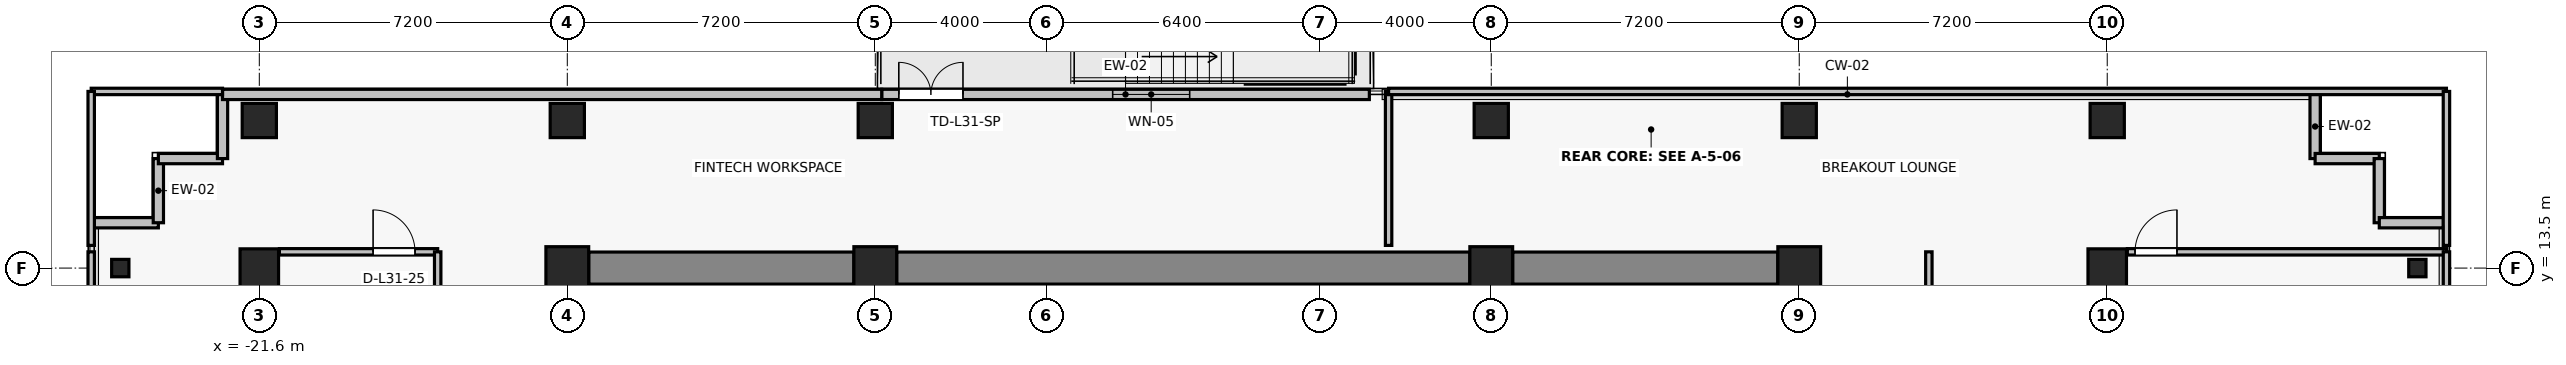
"""IFC4 building model, lengths in metres.
Left out: names, types, materials, properties, quantities, classifications, styles, units other than length and angle.
Written with IfcOpenShell. Run it as: python <this file> out.ifc"""

import sys

from ifc_helpers import new_model, si_unit, direction, frame, frame_2d, origin, origin_2d, place, context, subcontext, project, spatial, rectangle, i_section, extrude, source, transform, mapped, element, fill, save


model = new_model("IFC4")
c1 = context("Model", 3, precision=1e-05, world=origin(), true_north=direction((0.0, 1.0)))
c2 = subcontext(c1, "Body", "Model", "MODEL_VIEW")
j1 = project(units=[si_unit("LENGTHUNIT", "METRE"), si_unit("PLANEANGLEUNIT", "RADIAN")], contexts=[c1])
p1 = place(None, origin())
s1 = spatial("IfcSite", under=j1, at=p1, CompositionType="ELEMENT")
p2 = place(p1, origin())
s2 = spatial("IfcBuilding", under=s1, at=p2, CompositionType="ELEMENT")
p3 = place(p2, frame((0.0, 0.0, 113.2)))
s3 = spatial("IfcBuildingStorey", under=s2, at=p3, CompositionType="ELEMENT", Elevation=113.2)
for number, where, z_axis, x_axis in (
    (1, (-14.4, 13.5, 0.0), (0.0, 0.0, 1.0), (1.0, 0.0, 0.0)),
    (2, (-7.2, 13.5, 0.0), (0.0, 0.0, 1.0), (1.0, 0.0, 0.0)),
    (3, (7.2, 13.5, 0.0), (0.0, 0.0, 1.0), (1.0, 0.0, 0.0)),
    (4, (14.4, 13.5, 0.0), (0.0, 0.0, 1.0), (1.0, 0.0, 0.0)),
):
    element("IfcColumn", number, at=place(p3, frame(where, z_axis=z_axis, x_axis=x_axis)), inside=s3, PredefinedType="COLUMN", context=c2, shape_type="SweptSolid", body=[
        extrude(rectangle(XDim=1.0, YDim=1.0, at=origin_2d()), origin(), (0.0, 0.0, 1.0), 3.3),
    ])
for number, where, z_axis, x_axis in (
    (5, (-21.6, 13.5, 0.0), (0.0, 0.0, 1.0), (1.0, 0.0, 0.0)),
    (6, (21.6, 13.5, 0.0), (0.0, 0.0, 1.0), (1.0, 0.0, 0.0)),
):
    element("IfcColumn", number, at=place(p3, frame(where, z_axis=z_axis, x_axis=x_axis)), inside=s3, PredefinedType="COLUMN", context=c2, shape_type="SweptSolid", body=[
        extrude(rectangle(XDim=0.9, YDim=0.9, at=origin_2d()), origin(), (0.0, 0.0, 1.0), 3.3),
    ])
for number, where, z_axis, x_axis in (
    (7, (-14.4, 16.95, 0.0), (0.0, 0.0, 1.0), (1.0, 0.0, 0.0)),
    (8, (-7.2, 16.95, 0.0), (0.0, 0.0, 1.0), (1.0, 0.0, 0.0)),
    (9, (7.2, 16.95, 0.0), (0.0, 0.0, 1.0), (1.0, 0.0, 0.0)),
    (10, (14.4, 16.95, 0.0), (0.0, 0.0, 1.0), (1.0, 0.0, 0.0)),
    (11, (-21.6, 16.95, 0.0), (0.0, 0.0, 1.0), (1.0, 0.0, 0.0)),
    (12, (21.6, 16.95, 0.0), (0.0, 0.0, 1.0), (1.0, 0.0, 0.0)),
):
    element("IfcColumn", number, at=place(p3, frame(where, z_axis=z_axis, x_axis=x_axis)), inside=s3, PredefinedType="COLUMN", context=c2, shape_type="SweptSolid", body=[
        extrude(rectangle(XDim=0.8, YDim=0.8, at=origin_2d()), origin(), (0.0, 0.0, 1.0), 3.3),
    ])
for number, where, z_axis, x_axis in (
    (13, (-24.85, 13.5, 0.0), (0.0, 0.0, 1.0), (1.0, 0.0, 0.0)),
    (14, (28.85, 13.5, 0.0), (0.0, 0.0, 1.0), (1.0, 0.0, 0.0)),
):
    element("IfcColumn", number, at=place(p3, frame(where, z_axis=z_axis, x_axis=x_axis)), inside=s3, PredefinedType="COLUMN", context=c2, shape_type="SweptSolid", body=[
        extrude(i_section(OverallWidth=0.404, OverallDepth=0.407, WebThickness=0.022, FlangeThickness=0.032, FilletRadius=0.015, at=origin_2d()), origin(), (0.0, 0.0, 1.0), 3.3),
    ])
p4 = place(p3, frame((-13.9, 13.5, 0.0), z_axis=(0.0, 0.0, 1.0), x_axis=(1.0, 0.0, 0.0)))
e15 = element("IfcWall", 15, at=p4, inside=s3, PredefinedType="SHEAR", context=c2, shape_type="SweptSolid", body=[
    extrude(rectangle(XDim=6.2, YDim=0.75, at=frame_2d((3.1, 0.0))), origin(), (0.0, 0.0, 1.0), 3.075),
])
p5 = place(p3, frame((-6.7, 13.5, 0.0), z_axis=(0.0, 0.0, 1.0), x_axis=(1.0, 0.0, 0.0)))
e16 = element("IfcWall", 16, at=p5, inside=s3, PredefinedType="SHEAR", context=c2, shape_type="SweptSolid", body=[
    extrude(rectangle(XDim=13.4, YDim=0.75, at=frame_2d((6.7, 0.0))), origin(), (0.0, 0.0, 1.0), 3.075),
])
p6 = place(p3, frame((7.7, 13.5, 0.0), z_axis=(0.0, 0.0, 1.0), x_axis=(1.0, 0.0, 0.0)))
e17 = element("IfcWall", 17, at=p6, inside=s3, PredefinedType="SHEAR", context=c2, shape_type="SweptSolid", body=[
    extrude(rectangle(XDim=6.2, YDim=0.75, at=frame_2d((3.1, 0.0))), origin(), (0.0, 0.0, 1.0), 3.075),
])
p7 = place(p3, frame((-7.05, 17.56, 0.0), z_axis=(0.0, 0.0, 1.0), x_axis=(1.0, 0.0, 0.0)))
e18 = element("IfcWall", 18, at=p7, inside=s3, PredefinedType="SOLIDWALL", context=c2, shape_type="SweptSolid", body=[
    extrude(rectangle(XDim=11.4, YDim=0.24, at=frame_2d((5.7, 0.0))), origin(), (0.0, 0.0, 1.0), 2.59),
])
p8 = place(p7, frame((0.4, 0.0, 0.0)))
e19 = element("IfcOpeningElement", 19, at=p8, cuts=e18, PredefinedType="OPENING", context=c2, shape_type="SweptSolid", body=[
    extrude(rectangle(XDim=1.5, YDim=2.2, at=frame_2d((0.75, 1.1))), frame((0.0, 0.13, 0.0), z_axis=(0.0, -1.0, 0.0), x_axis=(1.0, 0.0, 0.0)), (0.0, 0.0, 1.0), 0.26),
])
p9 = place(p7, frame((5.4, 0.0, 0.85)))
e20 = element("IfcOpeningElement", 20, at=p9, cuts=e18, PredefinedType="OPENING", context=c2, shape_type="SweptSolid", body=[
    extrude(rectangle(XDim=1.8, YDim=1.6, at=frame_2d((0.9, 0.8))), frame((0.0, 0.13, 0.0), z_axis=(0.0, -1.0, 0.0), x_axis=(1.0, 0.0, 0.0)), (0.0, 0.0, 1.0), 0.26),
])
for number, where, z_axis, x_axis in (
    (21, (-23.96, 14.56, 0.0), (0.0, 0.0, 1.0), (-1.0, 0.0, 0.0)),
    (22, (-23.96, 16.06, 0.0), (0.0, 0.0, 1.0), (0.0, -1.0, 0.0)),
    (23, (-22.46, 16.06, 0.0), (0.0, 0.0, 1.0), (-1.0, 0.0, 0.0)),
):
    element("IfcWall", number, at=place(p3, frame(where, z_axis=z_axis, x_axis=x_axis)), inside=s3, PredefinedType="SOLIDWALL", context=c2, shape_type="SweptSolid", body=[
        extrude(rectangle(XDim=1.5, YDim=0.24, at=frame_2d((0.75, 0.0))), origin(), (0.0, 0.0, 1.0), 3.075),
    ])
p10 = place(p3, frame((-22.46, 17.56, 0.0), z_axis=(0.0, 0.0, 1.0), x_axis=(0.0, -1.0, 0.0)))
e24 = element("IfcWall", 24, at=p10, inside=s3, PredefinedType="SOLIDWALL", context=c2, shape_type="SweptSolid", body=[
    extrude(rectangle(XDim=1.5, YDim=0.24, at=frame_2d((0.75, 0.0))), origin(), (0.0, 0.0, 1.0), 2.565),
])
p11 = place(p3, frame((-7.05, 17.56, 0.0), z_axis=(0.0, 0.0, 1.0), x_axis=(-1.0, 0.0, 0.0)))
e25 = element("IfcWall", 25, at=p11, inside=s3, PredefinedType="SOLIDWALL", context=c2, shape_type="SweptSolid", body=[
    extrude(rectangle(XDim=15.41, YDim=0.24, at=frame_2d((7.705, 0.0))), origin(), (0.0, 0.0, 1.0), 2.59),
])
for number, where, z_axis, x_axis in (
    (26, (26.46, 16.06, 0.0), (0.0, 0.0, 1.0), (0.0, 1.0, 0.0)),
    (27, (27.96, 16.06, 0.0), (0.0, 0.0, 1.0), (-1.0, 0.0, 0.0)),
    (28, (27.96, 14.56, 0.0), (0.0, 0.0, 1.0), (0.0, 1.0, 0.0)),
    (29, (29.46, 14.56, 0.0), (0.0, 0.0, 1.0), (-1.0, 0.0, 0.0)),
):
    element("IfcWall", number, at=place(p3, frame(where, z_axis=z_axis, x_axis=x_axis)), inside=s3, PredefinedType="SOLIDWALL", context=c2, shape_type="SweptSolid", body=[
        extrude(rectangle(XDim=1.5, YDim=0.24, at=frame_2d((0.75, 0.0))), origin(), (0.0, 0.0, 1.0), 3.075),
    ])
p12 = place(p3, frame((3.92, 18.04, -0.25), z_axis=(0.0, 0.0, 1.0), x_axis=(0.0, 1.0, 0.0)))
e30 = element("IfcWall", 30, at=p12, inside=s3, PredefinedType="SOLIDWALL", context=c2, shape_type="SweptSolid", body=[
    extrude(rectangle(XDim=2.18, YDim=0.2, at=frame_2d((1.09, 0.0))), origin(), (0.0, 0.0, 1.0), 1.7),
])
p13 = place(p3, frame((1.45, 17.9, -0.25), z_axis=(0.0, 0.0, 1.0), x_axis=(1.0, 0.0, 0.0)))
e31 = element("IfcWall", 31, at=p13, inside=s3, PredefinedType="SOLIDWALL", context=c2, shape_type="SweptSolid", body=[
    extrude(rectangle(XDim=2.33, YDim=0.2, at=frame_2d((1.165, 0.0))), origin(), (0.0, 0.0, 1.0), 1.7),
])
p14 = place(p3, frame((-21.13, 13.88, 0.0), z_axis=(0.0, 0.0, 1.0), x_axis=(1.0, 0.0, 0.0)))
e32 = element("IfcWall", 32, at=p14, inside=s3, PredefinedType="PARTITIONING", context=c2, shape_type="SweptSolid", body=[
    extrude(rectangle(XDim=3.7, YDim=0.15, at=frame_2d((1.85, 0.0))), origin(), (0.0, 0.0, 1.0), 3.075),
])
p15 = place(p14, frame((2.19, 0.0, 0.0)))
e33 = element("IfcOpeningElement", 33, at=p15, cuts=e32, PredefinedType="OPENING", context=c2, shape_type="SweptSolid", body=[
    extrude(rectangle(XDim=0.98, YDim=2.15, at=frame_2d((0.49, 1.075))), frame((0.0, 0.085, 0.0), z_axis=(0.0, -1.0, 0.0), x_axis=(1.0, 0.0, 0.0)), (0.0, 0.0, 1.0), 0.17),
])
p16 = place(p3, frame((-25.53, 10.146, 0.0), z_axis=(0.0, 0.0, 1.0), x_axis=(0.0, 1.0, 0.0)))
e34 = element("IfcWall", 34, at=p16, inside=s3, PredefinedType="PARTITIONING", context=c2, shape_type="SweptSolid", body=[
    extrude(rectangle(XDim=3.734, YDim=0.15, at=frame_2d((1.867, 0.0))), origin(), (0.0, 0.0, 1.0), 3.075),
])
p17 = place(p3, frame((-17.43, 13.88, 0.0), z_axis=(0.0, 0.0, 1.0), x_axis=(0.0, -1.0, 0.0)))
e35 = element("IfcWall", 35, at=p17, inside=s3, PredefinedType="PARTITIONING", context=c2, shape_type="SweptSolid", body=[
    extrude(rectangle(XDim=3.734, YDim=0.15, at=frame_2d((1.867, 0.0))), origin(), (0.0, 0.0, 1.0), 2.515),
])
p18 = place(p17, frame((1.377, 0.0, 0.0)))
e36 = element("IfcOpeningElement", 36, at=p18, cuts=e35, PredefinedType="OPENING", context=c2, shape_type="SweptSolid", body=[
    extrude(rectangle(XDim=0.98, YDim=2.15, at=frame_2d((0.49, 1.075))), frame((0.0, 0.085, 0.0), z_axis=(0.0, -1.0, 0.0), x_axis=(1.0, 0.0, 0.0)), (0.0, 0.0, 1.0), 0.17),
])
p19 = place(p3, frame((22.07, 13.88, 0.0), z_axis=(0.0, 0.0, 1.0), x_axis=(1.0, 0.0, 0.0)))
e37 = element("IfcWall", 37, at=p19, inside=s3, PredefinedType="PARTITIONING", context=c2, shape_type="SweptSolid", body=[
    extrude(rectangle(XDim=7.46, YDim=0.15, at=frame_2d((3.73, 0.0))), origin(), (0.0, 0.0, 1.0), 3.075),
])
p20 = place(p19, frame((0.18, 0.0, 0.0)))
e38 = element("IfcOpeningElement", 38, at=p20, cuts=e37, PredefinedType="OPENING", context=c2, shape_type="SweptSolid", body=[
    extrude(rectangle(XDim=0.98, YDim=2.15, at=frame_2d((0.49, 1.075))), frame((0.0, 0.085, 0.0), z_axis=(0.0, -1.0, 0.0), x_axis=(1.0, 0.0, 0.0)), (0.0, 0.0, 1.0), 0.17),
])
p21 = place(p3, frame((17.43, 4.522, 0.0), z_axis=(0.0, 0.0, 1.0), x_axis=(0.0, 1.0, 0.0)))
e39 = element("IfcWall", 39, at=p21, inside=s3, PredefinedType="PARTITIONING", context=c2, shape_type="SweptSolid", body=[
    extrude(rectangle(XDim=9.358, YDim=0.15, at=frame_2d((4.679, 0.0))), origin(), (0.0, 0.0, 1.0), 2.515),
])
p22 = place(p21, frame((4.189, 0.0, 0.0)))
e40 = element("IfcOpeningElement", 40, at=p22, cuts=e39, PredefinedType="OPENING", context=c2, shape_type="SweptSolid", body=[
    extrude(rectangle(XDim=0.98, YDim=2.15, at=frame_2d((0.49, 1.075))), frame((0.0, 0.085, 0.0), z_axis=(0.0, -1.0, 0.0), x_axis=(1.0, 0.0, 0.0)), (0.0, 0.0, 1.0), 0.17),
])
p23 = place(p3, frame((29.53, 13.88, 0.0), z_axis=(0.0, 0.0, 1.0), x_axis=(0.0, -1.0, 0.0)))
e41 = element("IfcWall", 41, at=p23, inside=s3, PredefinedType="PARTITIONING", context=c2, shape_type="SweptSolid", body=[
    extrude(rectangle(XDim=9.358, YDim=0.15, at=frame_2d((4.679, 0.0))), origin(), (0.0, 0.0, 1.0), 3.075),
])
p24 = place(p3, frame((-25.53, 17.63, 0.0), z_axis=(0.0, 0.0, 1.0), x_axis=(1.0, 0.0, 0.0)))
e42 = element("IfcWall", 42, at=p24, inside=s3, PredefinedType="PARTITIONING", context=c2, shape_type="SweptSolid", body=[
    extrude(rectangle(XDim=3.07, YDim=0.15, at=frame_2d((1.535, 0.0))), origin(), (0.0, 0.0, 1.0), 2.59),
])
p25 = place(p3, frame((-25.53, 14.03, 0.0), z_axis=(0.0, 0.0, 1.0), x_axis=(0.0, 1.0, 0.0)))
e43 = element("IfcWall", 43, at=p25, inside=s3, PredefinedType="PARTITIONING", context=c2, shape_type="SweptSolid", body=[
    extrude(rectangle(XDim=3.6, YDim=0.15, at=frame_2d((1.8, 0.0))), origin(), (0.0, 0.0, 1.0), 3.075),
])
p26 = place(p3, frame((4.8, 17.63, 0.0), z_axis=(0.0, 0.0, 1.0), x_axis=(0.0, -1.0, 0.0)))
e44 = element("IfcWall", 44, at=p26, inside=s3, PredefinedType="PARTITIONING", context=c2, shape_type="SweptSolid", body=[
    extrude(rectangle(XDim=3.6, YDim=0.15, at=frame_2d((1.8, 0.0))), origin(), (0.0, 0.0, 1.0), 2.565),
])
p27 = place(p3, frame((4.8, 17.63, 0.0), z_axis=(0.0, 0.0, 1.0), x_axis=(1.0, 0.0, 0.0)))
e45 = element("IfcWall", 45, at=p27, inside=s3, PredefinedType="PARTITIONING", context=c2, shape_type="SweptSolid", body=[
    extrude(rectangle(XDim=24.73, YDim=0.15, at=frame_2d((12.365, 0.0))), origin(), (0.0, 0.0, 1.0), 3.075),
])
p28 = place(p3, frame((29.53, 17.63, 0.0), z_axis=(0.0, 0.0, 1.0), x_axis=(0.0, -1.0, 0.0)))
e46 = element("IfcWall", 46, at=p28, inside=s3, PredefinedType="PARTITIONING", context=c2, shape_type="SweptSolid", body=[
    extrude(rectangle(XDim=3.6, YDim=0.15, at=frame_2d((1.8, 0.0))), origin(), (0.0, 0.0, 1.0), 3.075),
])
m1 = source(origin(), c2, "Body", "SweptSolid", [
    extrude(rectangle(XDim=1.5, YDim=2.2, at=frame_2d((0.75, 1.1))), frame((0.0, 0.025, 0.0), z_axis=(0.0, -1.0, 0.0), x_axis=(1.0, 0.0, 0.0)), (0.0, 0.0, 1.0), 0.05),
])
p29 = place(p8, origin())
e47 = element("IfcDoor", 47, at=p29, inside=s3, OperationType="DOUBLE_DOOR_SINGLE_SWING", PredefinedType="DOOR", context=c2, shape_type="MappedRepresentation", body=[
    mapped(m1, transform((0.0, 0.0, 0.0), x_axis=(1.0, 0.0, 0.0), y_axis=(0.0, 1.0, 0.0), z_axis=(0.0, 0.0, 1.0), scale=1.0)),
])
fill(e19, e47)
m2 = source(origin(), c2, "Body", "SweptSolid", [
    extrude(rectangle(XDim=1.8, YDim=1.6, at=frame_2d((0.9, 0.8))), frame((0.0, 0.03, 0.0), z_axis=(0.0, -1.0, 0.0), x_axis=(1.0, 0.0, 0.0)), (0.0, 0.0, 1.0), 0.06),
])
p30 = place(p9, origin())
e48 = element("IfcWindow", 48, at=p30, inside=s3, PartitioningType="SINGLE_PANEL", PredefinedType="WINDOW", context=c2, shape_type="MappedRepresentation", body=[
    mapped(m2, transform((0.0, 0.0, 0.0), x_axis=(1.0, 0.0, 0.0), y_axis=(0.0, 1.0, 0.0), z_axis=(0.0, 0.0, 1.0), scale=1.0)),
])
fill(e20, e48)
m3 = source(origin(), c2, "Body", "SweptSolid", [
    extrude(rectangle(XDim=0.98, YDim=2.15, at=frame_2d((0.49, 1.075))), frame((0.0, 0.025, 0.0), z_axis=(0.0, -1.0, 0.0), x_axis=(1.0, 0.0, 0.0)), (0.0, 0.0, 1.0), 0.05),
])
p31 = place(p15, origin())
e49 = element("IfcDoor", 49, at=p31, inside=s3, OperationType="SINGLE_SWING_LEFT", PredefinedType="DOOR", context=c2, shape_type="MappedRepresentation", body=[
    mapped(m3, transform((0.0, 0.0, 0.0), x_axis=(1.0, 0.0, 0.0), y_axis=(0.0, 1.0, 0.0), z_axis=(0.0, 0.0, 1.0), scale=1.0)),
])
fill(e33, e49)
p32 = place(p20, origin())
e50 = element("IfcDoor", 50, at=p32, inside=s3, OperationType="SINGLE_SWING_RIGHT", PredefinedType="DOOR", context=c2, shape_type="MappedRepresentation", body=[
    mapped(m3, transform((0.0, 0.0, 0.0), x_axis=(1.0, 0.0, 0.0), y_axis=(0.0, 1.0, 0.0), z_axis=(0.0, 0.0, 1.0), scale=1.0)),
])
fill(e38, e50)
save(model, sys.argv[1])
